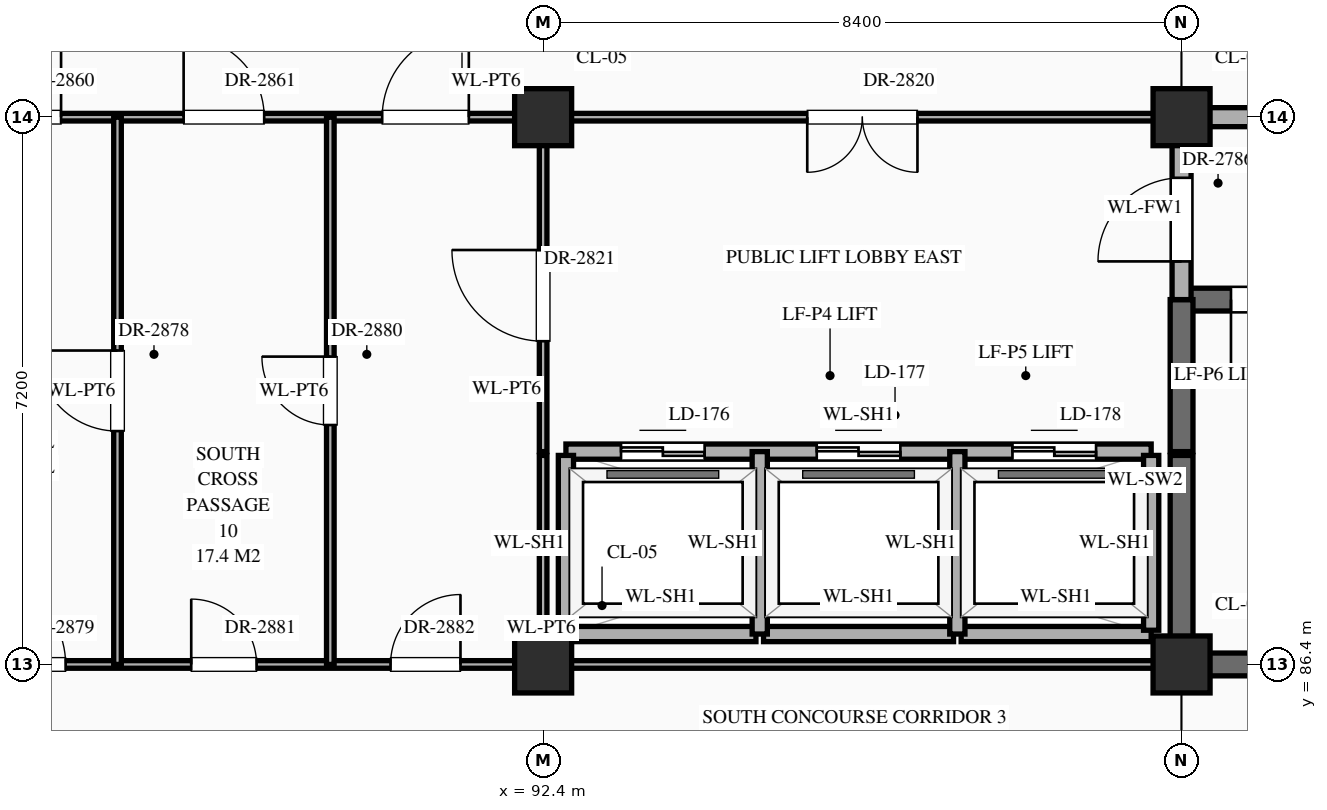
"""IFC4 building model, lengths in metres.
Left out: names, types, materials, properties, quantities, classifications, styles, units other than length and angle.
Written with IfcOpenShell. Run it as: python <this file> out.ifc"""

import sys

from ifc_helpers import new_model, si_unit, direction, frame, frame_2d, origin, origin_2d, place, context, subcontext, project, spatial, rectangle, extrude, element, fill, save


model = new_model("IFC4")
c1 = context("Model", 3, precision=1e-05, world=origin(), true_north=direction((0.0, 1.0)))
c2 = subcontext(c1, "Body", "Model", "MODEL_VIEW")
j1 = project(units=[si_unit("LENGTHUNIT", "METRE"), si_unit("PLANEANGLEUNIT", "RADIAN")], contexts=[c1])
p1 = place(None, origin())
s1 = spatial("IfcSite", under=j1, at=p1, CompositionType="ELEMENT")
p2 = place(p1, origin())
s2 = spatial("IfcBuilding", under=s1, at=p2, CompositionType="ELEMENT")
p3 = place(p2, frame((0.0, 0.0, 43.5)))
s3 = spatial("IfcBuildingStorey", under=s2, at=p3, CompositionType="ELEMENT", Elevation=43.5)
for number, where, z_axis, x_axis in (
    (1, (92.4, 86.4, 0.0), (0.0, 0.0, 1.0), (1.0, 0.0, 0.0)),
    (2, (92.4, 93.6, 0.0), (0.0, 0.0, 1.0), (1.0, 0.0, 0.0)),
    (3, (100.8, 86.4, 0.0), (0.0, 0.0, 1.0), (1.0, 0.0, 0.0)),
    (4, (100.8, 93.6, 0.0), (0.0, 0.0, 1.0), (1.0, 0.0, 0.0)),
):
    element("IfcColumn", number, at=place(p3, frame(where, z_axis=z_axis, x_axis=x_axis)), inside=s3, PredefinedType="COLUMN", context=c2, shape_type="SweptSolid", body=[
        extrude(rectangle(XDim=0.75, YDim=0.75, at=origin_2d()), origin(), (0.0, 0.0, 1.0), 4.2),
    ])
p4 = place(p3, frame((84.0, 86.4, 0.0), z_axis=(0.0, 0.0, 1.0), x_axis=(1.0, 0.0, 0.0)))
e5 = element("IfcWall", 5, at=p4, inside=s3, PredefinedType="STANDARD", context=c2, shape_type="SweptSolid", body=[
    extrude(rectangle(XDim=8.4, YDim=0.1, at=frame_2d((4.2, 0.0))), origin(), (0.0, 0.0, 1.0), 3.1),
])
p5 = place(p4, frame((0.978, 0.0, 0.0)))
e6 = element("IfcOpeningElement", 6, at=p5, cuts=e5, PredefinedType="OPENING", context=c2, shape_type="SweptSolid", body=[
    extrude(rectangle(XDim=1.14, YDim=2.4, at=frame_2d((0.57, 1.2))), frame((0.0, 0.062, 0.0), z_axis=(0.0, -1.0, 0.0), x_axis=(1.0, 0.0, 0.0)), (0.0, 0.0, 1.0), 0.124),
])
p6 = place(p4, frame((3.77, 0.0, 0.0)))
e7 = element("IfcOpeningElement", 7, at=p6, cuts=e5, PredefinedType="OPENING", context=c2, shape_type="SweptSolid", body=[
    extrude(rectangle(XDim=0.86, YDim=2.1, at=frame_2d((0.43, 1.05))), frame((0.0, 0.062, 0.0), z_axis=(0.0, -1.0, 0.0), x_axis=(1.0, 0.0, 0.0)), (0.0, 0.0, 1.0), 0.124),
])
p7 = place(p4, frame((6.393, 0.0, 0.0)))
e8 = element("IfcOpeningElement", 8, at=p7, cuts=e5, PredefinedType="OPENING", context=c2, shape_type="SweptSolid", body=[
    extrude(rectangle(XDim=0.92, YDim=2.15, at=frame_2d((0.46, 1.075))), frame((0.0, 0.062, 0.0), z_axis=(0.0, -1.0, 0.0), x_axis=(1.0, 0.0, 0.0)), (0.0, 0.0, 1.0), 0.124),
])
p8 = place(p3, frame((92.45, 86.4, 0.0), z_axis=(0.0, 0.0, 1.0), x_axis=(1.0, 0.0, 0.0)))
e9 = element("IfcWall", 9, at=p8, inside=s3, PredefinedType="STANDARD", context=c2, shape_type="SweptSolid", body=[
    extrude(rectangle(XDim=8.3, YDim=0.1, at=frame_2d((4.15, 0.0))), origin(), (0.0, 0.0, 1.0), 3.1),
])
p9 = place(p3, frame((100.8, 86.4, 0.0), z_axis=(0.0, 0.0, 1.0), x_axis=(1.0, 0.0, 0.0)))
e10 = element("IfcWall", 10, at=p9, inside=s3, PredefinedType="SHEAR", context=c2, shape_type="SweptSolid", body=[
    extrude(rectangle(XDim=8.4, YDim=0.3, at=frame_2d((4.2, 0.0))), origin(), (0.0, 0.0, 1.0), 3.95),
])
for number, where, z_axis, x_axis in (
    (11, (92.7, 86.8, 0.0), (0.0, 0.0, 1.0), (1.0, 0.0, 0.0)),
    (12, (95.3, 86.8, 0.0), (0.0, 0.0, 1.0), (1.0, 0.0, 0.0)),
    (13, (97.9, 86.8, 0.0), (0.0, 0.0, 1.0), (1.0, 0.0, 0.0)),
):
    element("IfcWall", number, at=place(p3, frame(where, z_axis=z_axis, x_axis=x_axis)), inside=s3, PredefinedType="STANDARD", context=c2, shape_type="SweptSolid", body=[
        extrude(rectangle(XDim=2.5, YDim=0.2, at=frame_2d((1.25, 0.0))), origin(), (0.0, 0.0, 1.0), 3.95),
    ])
p10 = place(p3, frame((92.7, 89.2, 0.0), z_axis=(0.0, 0.0, 1.0), x_axis=(1.0, 0.0, 0.0)))
e14 = element("IfcWall", 14, at=p10, inside=s3, PredefinedType="STANDARD", context=c2, shape_type="SweptSolid", body=[
    extrude(rectangle(XDim=7.7, YDim=0.2, at=frame_2d((3.85, 0.0))), origin(), (0.0, 0.0, 1.0), 3.95),
])
p11 = place(p10, frame((0.725, 0.0, 0.0)))
e15 = element("IfcOpeningElement", 15, at=p11, cuts=e14, PredefinedType="OPENING", context=c2, shape_type="SweptSolid", body=[
    extrude(rectangle(XDim=1.1, YDim=2.15, at=frame_2d((0.55, 1.075))), frame((0.0, 0.112, 0.0), z_axis=(0.0, -1.0, 0.0), x_axis=(1.0, 0.0, 0.0)), (0.0, 0.0, 1.0), 0.224),
])
p12 = place(p10, frame((3.3, 0.0, 0.0)))
e16 = element("IfcOpeningElement", 16, at=p12, cuts=e14, PredefinedType="OPENING", context=c2, shape_type="SweptSolid", body=[
    extrude(rectangle(XDim=1.1, YDim=2.15, at=frame_2d((0.55, 1.075))), frame((0.0, 0.112, 0.0), z_axis=(0.0, -1.0, 0.0), x_axis=(1.0, 0.0, 0.0)), (0.0, 0.0, 1.0), 0.224),
])
p13 = place(p10, frame((5.875, 0.0, 0.0)))
e17 = element("IfcOpeningElement", 17, at=p13, cuts=e14, PredefinedType="OPENING", context=c2, shape_type="SweptSolid", body=[
    extrude(rectangle(XDim=1.1, YDim=2.15, at=frame_2d((0.55, 1.075))), frame((0.0, 0.112, 0.0), z_axis=(0.0, -1.0, 0.0), x_axis=(1.0, 0.0, 0.0)), (0.0, 0.0, 1.0), 0.224),
])
p14 = place(p3, frame((100.8, 91.2, 0.0), z_axis=(0.0, 0.0, 1.0), x_axis=(1.0, 0.0, 0.0)))
e18 = element("IfcWall", 18, at=p14, inside=s3, PredefinedType="SHEAR", context=c2, shape_type="SweptSolid", body=[
    extrude(rectangle(XDim=8.4, YDim=0.3, at=frame_2d((4.2, 0.0))), origin(), (0.0, 0.0, 1.0), 3.95),
])
p15 = place(p14, frame((0.65, 0.0, 0.0)))
e19 = element("IfcOpeningElement", 19, at=p15, cuts=e18, PredefinedType="OPENING", context=c2, shape_type="SweptSolid", body=[
    extrude(rectangle(XDim=1.1, YDim=2.2, at=frame_2d((0.55, 1.1))), frame((0.0, 0.162, 0.0), z_axis=(0.0, -1.0, 0.0), x_axis=(1.0, 0.0, 0.0)), (0.0, 0.0, 1.0), 0.324),
])
p16 = place(p3, frame((67.2, 93.6, 0.0), z_axis=(0.0, 0.0, 1.0), x_axis=(1.0, 0.0, 0.0)))
e20 = element("IfcWall", 20, at=p16, inside=s3, PredefinedType="STANDARD", context=c2, shape_type="SweptSolid", body=[
    extrude(rectangle(XDim=33.6, YDim=0.1, at=frame_2d((16.8, 0.0))), origin(), (0.0, 0.0, 1.0), 3.1),
])
p17 = place(p16, frame((3.35, 0.0, 0.0)))
e21 = element("IfcOpeningElement", 21, at=p17, cuts=e20, PredefinedType="OPENING", context=c2, shape_type="SweptSolid", body=[
    extrude(rectangle(XDim=1.7, YDim=2.45, at=frame_2d((0.85, 1.225))), frame((0.0, 0.062, 0.0), z_axis=(0.0, -1.0, 0.0), x_axis=(1.0, 0.0, 0.0)), (0.0, 0.0, 1.0), 0.124),
])
p18 = place(p16, frame((28.675, 0.0, 0.0)))
e22 = element("IfcOpeningElement", 22, at=p18, cuts=e20, PredefinedType="OPENING", context=c2, shape_type="SweptSolid", body=[
    extrude(rectangle(XDim=1.45, YDim=2.3, at=frame_2d((0.725, 1.15))), frame((0.0, 0.062, 0.0), z_axis=(0.0, -1.0, 0.0), x_axis=(1.0, 0.0, 0.0)), (0.0, 0.0, 1.0), 0.124),
])
p19 = place(p16, frame((11.75, 0.0, 0.0)))
e23 = element("IfcOpeningElement", 23, at=p19, cuts=e20, PredefinedType="OPENING", context=c2, shape_type="SweptSolid", body=[
    extrude(rectangle(XDim=1.7, YDim=2.45, at=frame_2d((0.85, 1.225))), frame((0.0, 0.062, 0.0), z_axis=(0.0, -1.0, 0.0), x_axis=(1.0, 0.0, 0.0)), (0.0, 0.0, 1.0), 0.124),
])
p20 = place(p16, frame((17.837, 0.0, 0.0)))
e24 = element("IfcOpeningElement", 24, at=p20, cuts=e20, PredefinedType="OPENING", context=c2, shape_type="SweptSolid", body=[
    extrude(rectangle(XDim=1.02, YDim=2.4, at=frame_2d((0.51, 1.2))), frame((0.0, 0.062, 0.0), z_axis=(0.0, -1.0, 0.0), x_axis=(1.0, 0.0, 0.0)), (0.0, 0.0, 1.0), 0.124),
])
p21 = place(p16, frame((20.47, 0.0, 0.0)))
e25 = element("IfcOpeningElement", 25, at=p21, cuts=e20, PredefinedType="OPENING", context=c2, shape_type="SweptSolid", body=[
    extrude(rectangle(XDim=1.06, YDim=2.4, at=frame_2d((0.53, 1.2))), frame((0.0, 0.062, 0.0), z_axis=(0.0, -1.0, 0.0), x_axis=(1.0, 0.0, 0.0)), (0.0, 0.0, 1.0), 0.124),
])
p22 = place(p16, frame((23.083, 0.0, 0.0)))
e26 = element("IfcOpeningElement", 26, at=p22, cuts=e20, PredefinedType="OPENING", context=c2, shape_type="SweptSolid", body=[
    extrude(rectangle(XDim=1.14, YDim=2.4, at=frame_2d((0.57, 1.2))), frame((0.0, 0.062, 0.0), z_axis=(0.0, -1.0, 0.0), x_axis=(1.0, 0.0, 0.0)), (0.0, 0.0, 1.0), 0.124),
])
p23 = place(p3, frame((100.8, 93.6, 0.0), z_axis=(0.0, 0.0, 1.0), x_axis=(1.0, 0.0, 0.0)))
e27 = element("IfcWall", 27, at=p23, inside=s3, PredefinedType="STANDARD", context=c2, shape_type="SweptSolid", body=[
    extrude(rectangle(XDim=8.4, YDim=0.25, at=frame_2d((4.2, 0.0))), origin(), (0.0, 0.0, 1.0), 3.1),
])
p24 = place(p23, frame((3.3, 0.0, 0.0)))
e28 = element("IfcOpeningElement", 28, at=p24, cuts=e27, PredefinedType="OPENING", context=c2, shape_type="SweptSolid", body=[
    extrude(rectangle(XDim=1.8, YDim=2.35, at=frame_2d((0.9, 1.175))), frame((0.0, 0.137, 0.0), z_axis=(0.0, -1.0, 0.0), x_axis=(1.0, 0.0, 0.0)), (0.0, 0.0, 1.0), 0.274),
])
p25 = place(p3, frame((86.8, 86.4, 0.0), z_axis=(0.0, 0.0, 1.0), x_axis=(0.0, 1.0, 0.0)))
e29 = element("IfcWall", 29, at=p25, inside=s3, PredefinedType="STANDARD", context=c2, shape_type="SweptSolid", body=[
    extrude(rectangle(XDim=7.2, YDim=0.1, at=frame_2d((3.6, 0.0))), origin(), (0.0, 0.0, 1.0), 3.95),
])
p26 = place(p25, frame((3.07, 0.0, 0.0)))
e30 = element("IfcOpeningElement", 30, at=p26, cuts=e29, PredefinedType="OPENING", context=c2, shape_type="SweptSolid", body=[
    extrude(rectangle(XDim=1.06, YDim=2.4, at=frame_2d((0.53, 1.2))), frame((0.0, 0.062, 0.0), z_axis=(0.0, -1.0, 0.0), x_axis=(1.0, 0.0, 0.0)), (0.0, 0.0, 1.0), 0.124),
])
p27 = place(p3, frame((89.6, 86.4, 0.0), z_axis=(0.0, 0.0, 1.0), x_axis=(0.0, 1.0, 0.0)))
e31 = element("IfcWall", 31, at=p27, inside=s3, PredefinedType="STANDARD", context=c2, shape_type="SweptSolid", body=[
    extrude(rectangle(XDim=7.2, YDim=0.1, at=frame_2d((3.6, 0.0))), origin(), (0.0, 0.0, 1.0), 3.95),
])
p28 = place(p27, frame((3.15, 0.0, 0.0)))
e32 = element("IfcOpeningElement", 32, at=p28, cuts=e31, PredefinedType="OPENING", context=c2, shape_type="SweptSolid", body=[
    extrude(rectangle(XDim=0.9, YDim=2.15, at=frame_2d((0.45, 1.075))), frame((0.0, 0.062, 0.0), z_axis=(0.0, -1.0, 0.0), x_axis=(1.0, 0.0, 0.0)), (0.0, 0.0, 1.0), 0.124),
])
p29 = place(p3, frame((92.4, 86.45, 0.0), z_axis=(0.0, 0.0, 1.0), x_axis=(0.0, 1.0, 0.0)))
e33 = element("IfcWall", 33, at=p29, inside=s3, PredefinedType="STANDARD", context=c2, shape_type="SweptSolid", body=[
    extrude(rectangle(XDim=2.7, YDim=0.1, at=frame_2d((1.35, 0.0))), origin(), (0.0, 0.0, 1.0), 3.2),
])
p30 = place(p3, frame((92.4, 89.2, 0.0), z_axis=(0.0, 0.0, 1.0), x_axis=(0.0, 1.0, 0.0)))
e34 = element("IfcWall", 34, at=p30, inside=s3, PredefinedType="STANDARD", context=c2, shape_type="SweptSolid", body=[
    extrude(rectangle(XDim=4.4, YDim=0.1, at=frame_2d((2.2, 0.0))), origin(), (0.0, 0.0, 1.0), 3.2),
])
p31 = place(p30, frame((1.452, 0.0, 0.0)))
e35 = element("IfcOpeningElement", 35, at=p31, cuts=e34, PredefinedType="OPENING", context=c2, shape_type="SweptSolid", body=[
    extrude(rectangle(XDim=1.2, YDim=2.35, at=frame_2d((0.6, 1.175))), frame((0.0, 0.062, 0.0), z_axis=(0.0, -1.0, 0.0), x_axis=(1.0, 0.0, 0.0)), (0.0, 0.0, 1.0), 0.124),
])
p32 = place(p3, frame((92.7, 86.85, 0.0), z_axis=(0.0, 0.0, 1.0), x_axis=(0.0, 1.0, 0.0)))
e36 = element("IfcWall", 36, at=p32, inside=s3, PredefinedType="STANDARD", context=c2, shape_type="SweptSolid", body=[
    extrude(rectangle(XDim=2.3, YDim=0.2, at=frame_2d((1.15, 0.0))), origin(), (0.0, 0.0, 1.0), 3.95),
])
for number, where, z_axis, x_axis in (
    (37, (95.25, 86.8, 0.0), (0.0, 0.0, 1.0), (0.0, 1.0, 0.0)),
    (38, (97.85, 86.8, 0.0), (0.0, 0.0, 1.0), (0.0, 1.0, 0.0)),
):
    element("IfcWall", number, at=place(p3, frame(where, z_axis=z_axis, x_axis=x_axis)), inside=s3, PredefinedType="STANDARD", context=c2, shape_type="SweptSolid", body=[
        extrude(rectangle(XDim=2.4, YDim=0.2, at=frame_2d((1.2, 0.0))), origin(), (0.0, 0.0, 1.0), 3.95),
    ])
p33 = place(p3, frame((100.4, 86.85, 0.0), z_axis=(0.0, 0.0, 1.0), x_axis=(0.0, 1.0, 0.0)))
e39 = element("IfcWall", 39, at=p33, inside=s3, PredefinedType="STANDARD", context=c2, shape_type="SweptSolid", body=[
    extrude(rectangle(XDim=2.3, YDim=0.2, at=frame_2d((1.15, 0.0))), origin(), (0.0, 0.0, 1.0), 3.95),
])
p34 = place(p3, frame((100.8, 86.45, 0.0), z_axis=(0.0, 0.0, 1.0), x_axis=(0.0, 1.0, 0.0)))
e40 = element("IfcWall", 40, at=p34, inside=s3, PredefinedType="SHEAR", context=c2, shape_type="SweptSolid", body=[
    extrude(rectangle(XDim=2.7, YDim=0.3, at=frame_2d((1.35, 0.0))), origin(), (0.0, 0.0, 1.0), 3.95),
])
p35 = place(p3, frame((100.8, 89.2, 0.0), z_axis=(0.0, 0.0, 1.0), x_axis=(0.0, 1.0, 0.0)))
e41 = element("IfcWall", 41, at=p35, inside=s3, PredefinedType="SHEAR", context=c2, shape_type="SweptSolid", body=[
    extrude(rectangle(XDim=2.0, YDim=0.3, at=frame_2d((1.0, 0.0))), origin(), (0.0, 0.0, 1.0), 3.95),
])
p36 = place(p3, frame((100.8, 91.2, 0.0), z_axis=(0.0, 0.0, 1.0), x_axis=(0.0, 1.0, 0.0)))
e42 = element("IfcWall", 42, at=p36, inside=s3, PredefinedType="STANDARD", context=c2, shape_type="SweptSolid", body=[
    extrude(rectangle(XDim=2.4, YDim=0.25, at=frame_2d((1.2, 0.0))), origin(), (0.0, 0.0, 1.0), 3.2),
])
p37 = place(p36, frame((0.502, 0.0, 0.0)))
e43 = element("IfcOpeningElement", 43, at=p37, cuts=e42, PredefinedType="OPENING", context=c2, shape_type="SweptSolid", body=[
    extrude(rectangle(XDim=1.1, YDim=2.2, at=frame_2d((0.55, 1.1))), frame((0.0, 0.137, 0.0), z_axis=(0.0, -1.0, 0.0), x_axis=(1.0, 0.0, 0.0)), (0.0, 0.0, 1.0), 0.274),
])
p38 = place(p11, origin())
e44 = element("IfcDoor", 44, at=p38, inside=s3, OperationType="DOUBLE_DOOR_SLIDING", PredefinedType="DOOR", context=c2, shape_type="SweptSolid", body=[
    extrude(rectangle(XDim=1.1, YDim=2.15, at=frame_2d((0.55, 1.075))), frame((0.0, 0.025, 0.0), z_axis=(0.0, -1.0, 0.0), x_axis=(1.0, 0.0, 0.0)), (0.0, 0.0, 1.0), 0.05),
])
fill(e15, e44)
p39 = place(p12, origin())
e45 = element("IfcDoor", 45, at=p39, inside=s3, OperationType="DOUBLE_DOOR_SLIDING", PredefinedType="DOOR", context=c2, shape_type="SweptSolid", body=[
    extrude(rectangle(XDim=1.1, YDim=2.15, at=frame_2d((0.55, 1.075))), frame((0.0, 0.025, 0.0), z_axis=(0.0, -1.0, 0.0), x_axis=(1.0, 0.0, 0.0)), (0.0, 0.0, 1.0), 0.05),
])
fill(e16, e45)
p40 = place(p13, origin())
e46 = element("IfcDoor", 46, at=p40, inside=s3, OperationType="DOUBLE_DOOR_SLIDING", PredefinedType="DOOR", context=c2, shape_type="SweptSolid", body=[
    extrude(rectangle(XDim=1.1, YDim=2.15, at=frame_2d((0.55, 1.075))), frame((0.0, 0.025, 0.0), z_axis=(0.0, -1.0, 0.0), x_axis=(1.0, 0.0, 0.0)), (0.0, 0.0, 1.0), 0.05),
])
fill(e17, e46)
p41 = place(p15, frame((1.1, 0.0, 0.0), z_axis=(0.0, 0.0, 1.0), x_axis=(-1.0, 0.0, 0.0)))
e47 = element("IfcDoor", 47, at=p41, inside=s3, OperationType="SINGLE_SWING_RIGHT", PredefinedType="DOOR", context=c2, shape_type="SweptSolid", body=[
    extrude(rectangle(XDim=1.1, YDim=2.2, at=frame_2d((0.55, 1.1))), frame((0.0, 0.025, 0.0), z_axis=(0.0, -1.0, 0.0), x_axis=(1.0, 0.0, 0.0)), (0.0, 0.0, 1.0), 0.05),
])
fill(e19, e47)
p42 = place(p37, origin())
e48 = element("IfcDoor", 48, at=p42, inside=s3, OperationType="SINGLE_SWING_LEFT", PredefinedType="DOOR", context=c2, shape_type="SweptSolid", body=[
    extrude(rectangle(XDim=1.1, YDim=2.2, at=frame_2d((0.55, 1.1))), frame((0.0, 0.025, 0.0), z_axis=(0.0, -1.0, 0.0), x_axis=(1.0, 0.0, 0.0)), (0.0, 0.0, 1.0), 0.05),
])
fill(e43, e48)
p43 = place(p18, frame((1.45, 0.0, 0.0), z_axis=(0.0, 0.0, 1.0), x_axis=(-1.0, 0.0, 0.0)))
e49 = element("IfcDoor", 49, at=p43, inside=s3, OperationType="DOUBLE_DOOR_SINGLE_SWING", PredefinedType="DOOR", context=c2, shape_type="SweptSolid", body=[
    extrude(rectangle(XDim=1.45, YDim=2.3, at=frame_2d((0.725, 1.15))), frame((0.0, 0.025, 0.0), z_axis=(0.0, -1.0, 0.0), x_axis=(1.0, 0.0, 0.0)), (0.0, 0.0, 1.0), 0.05),
])
fill(e22, e49)
p44 = place(p31, origin())
e50 = element("IfcDoor", 50, at=p44, inside=s3, OperationType="SINGLE_SWING_RIGHT", PredefinedType="DOOR", context=c2, shape_type="SweptSolid", body=[
    extrude(rectangle(XDim=1.2, YDim=2.35, at=frame_2d((0.6, 1.175))), frame((0.0, 0.025, 0.0), z_axis=(0.0, -1.0, 0.0), x_axis=(1.0, 0.0, 0.0)), (0.0, 0.0, 1.0), 0.05),
])
fill(e35, e50)
p45 = place(p20, origin())
e51 = element("IfcDoor", 51, at=p45, inside=s3, OperationType="SINGLE_SWING_RIGHT", PredefinedType="DOOR", context=c2, shape_type="SweptSolid", body=[
    extrude(rectangle(XDim=1.02, YDim=2.4, at=frame_2d((0.51, 1.2))), frame((0.0, 0.025, 0.0), z_axis=(0.0, -1.0, 0.0), x_axis=(1.0, 0.0, 0.0)), (0.0, 0.0, 1.0), 0.05),
])
fill(e24, e51)
p46 = place(p21, origin())
e52 = element("IfcDoor", 52, at=p46, inside=s3, OperationType="SINGLE_SWING_LEFT", PredefinedType="DOOR", context=c2, shape_type="SweptSolid", body=[
    extrude(rectangle(XDim=1.06, YDim=2.4, at=frame_2d((0.53, 1.2))), frame((0.0, 0.025, 0.0), z_axis=(0.0, -1.0, 0.0), x_axis=(1.0, 0.0, 0.0)), (0.0, 0.0, 1.0), 0.05),
])
fill(e25, e52)
p47 = place(p22, origin())
e53 = element("IfcDoor", 53, at=p47, inside=s3, OperationType="SINGLE_SWING_RIGHT", PredefinedType="DOOR", context=c2, shape_type="SweptSolid", body=[
    extrude(rectangle(XDim=1.14, YDim=2.4, at=frame_2d((0.57, 1.2))), frame((0.0, 0.025, 0.0), z_axis=(0.0, -1.0, 0.0), x_axis=(1.0, 0.0, 0.0)), (0.0, 0.0, 1.0), 0.05),
])
fill(e26, e53)
p48 = place(p26, origin())
e54 = element("IfcDoor", 54, at=p48, inside=s3, OperationType="SINGLE_SWING_RIGHT", PredefinedType="DOOR", context=c2, shape_type="SweptSolid", body=[
    extrude(rectangle(XDim=1.06, YDim=2.4, at=frame_2d((0.53, 1.2))), frame((0.0, 0.025, 0.0), z_axis=(0.0, -1.0, 0.0), x_axis=(1.0, 0.0, 0.0)), (0.0, 0.0, 1.0), 0.05),
])
fill(e30, e54)
p49 = place(p5, origin())
e55 = element("IfcDoor", 55, at=p49, inside=s3, OperationType="SINGLE_SWING_LEFT", PredefinedType="DOOR", context=c2, shape_type="SweptSolid", body=[
    extrude(rectangle(XDim=1.14, YDim=2.4, at=frame_2d((0.57, 1.2))), frame((0.0, 0.025, 0.0), z_axis=(0.0, -1.0, 0.0), x_axis=(1.0, 0.0, 0.0)), (0.0, 0.0, 1.0), 0.05),
])
fill(e6, e55)
p50 = place(p28, origin())
e56 = element("IfcDoor", 56, at=p50, inside=s3, OperationType="SINGLE_SWING_RIGHT", PredefinedType="DOOR", context=c2, shape_type="SweptSolid", body=[
    extrude(rectangle(XDim=0.9, YDim=2.15, at=frame_2d((0.45, 1.075))), frame((0.0, 0.025, 0.0), z_axis=(0.0, -1.0, 0.0), x_axis=(1.0, 0.0, 0.0)), (0.0, 0.0, 1.0), 0.05),
])
fill(e32, e56)
p51 = place(p6, origin())
e57 = element("IfcDoor", 57, at=p51, inside=s3, OperationType="SINGLE_SWING_LEFT", PredefinedType="DOOR", context=c2, shape_type="SweptSolid", body=[
    extrude(rectangle(XDim=0.86, YDim=2.1, at=frame_2d((0.43, 1.05))), frame((0.0, 0.025, 0.0), z_axis=(0.0, -1.0, 0.0), x_axis=(1.0, 0.0, 0.0)), (0.0, 0.0, 1.0), 0.05),
])
fill(e7, e57)
p52 = place(p7, origin())
e58 = element("IfcDoor", 58, at=p52, inside=s3, OperationType="SINGLE_SWING_RIGHT", PredefinedType="DOOR", context=c2, shape_type="SweptSolid", body=[
    extrude(rectangle(XDim=0.92, YDim=2.15, at=frame_2d((0.46, 1.075))), frame((0.0, 0.025, 0.0), z_axis=(0.0, -1.0, 0.0), x_axis=(1.0, 0.0, 0.0)), (0.0, 0.0, 1.0), 0.05),
])
fill(e8, e58)
save(model, sys.argv[1])
